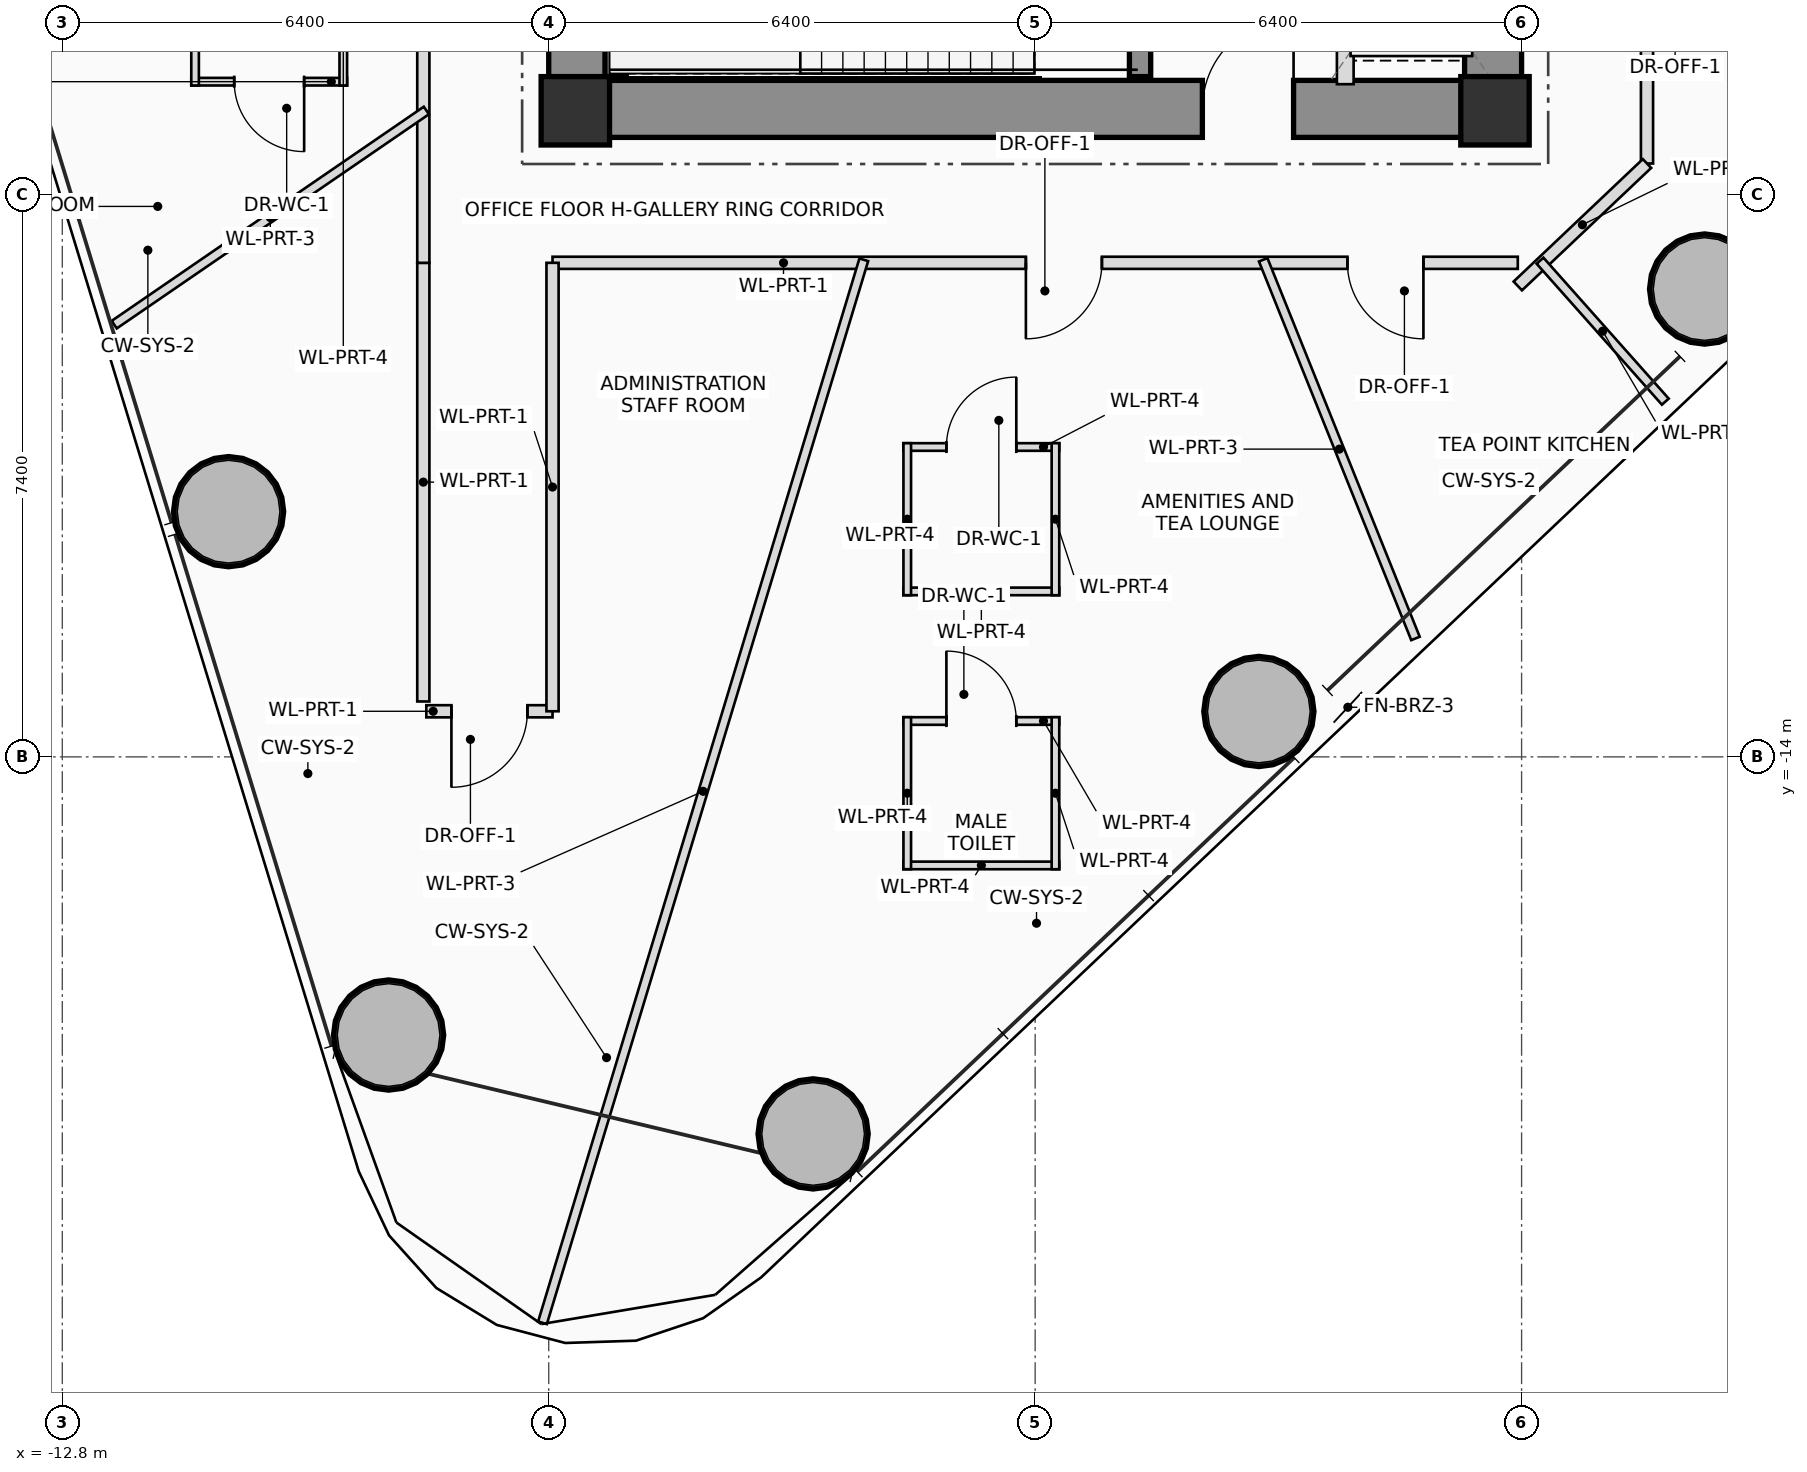
"""IFC4 building model, lengths in metres.
Left out: names, types, materials, properties, quantities, classifications, styles, units other than length and angle.
Written with IfcOpenShell. Run it as: python <this file> out.ifc"""

import sys

from ifc_helpers import new_model, si_unit, direction, frame, frame_2d, origin, origin_2d, place, context, subcontext, project, spatial, rectangle, hollow_circle, extrude, source, transform, mapped, element, fill, save


model = new_model("IFC4")
c1 = context("Model", 3, precision=1e-05, world=origin(), true_north=direction((0.0, 1.0)))
c2 = subcontext(c1, "Body", "Model", "MODEL_VIEW")
j1 = project(units=[si_unit("LENGTHUNIT", "METRE"), si_unit("PLANEANGLEUNIT", "RADIAN")], contexts=[c1])
p1 = place(None, origin())
s1 = spatial("IfcSite", under=j1, at=p1, CompositionType="ELEMENT")
p2 = place(p1, origin())
s2 = spatial("IfcBuilding", under=s1, at=p2, CompositionType="ELEMENT")
p3 = place(p2, frame((0.0, 0.0, 89.9)))
s3 = spatial("IfcBuildingStorey", under=s2, at=p3, CompositionType="ELEMENT", Elevation=89.9)
m1 = source(origin(), c2, "Body", "SweptSolid", [
    extrude(rectangle(XDim=0.9, YDim=0.9, at=origin_2d()), origin(), (0.0, 0.0, 1.0), 3.75),
])
for number, where, z_axis, x_axis in (
    (1, (-6.05, -5.5, 0.0), (0.0, 0.0, 1.0), (1.0, 0.0, 0.0)),
    (2, (6.05, -5.5, 0.0), (0.0, 0.0, 1.0), (1.0, 0.0, 0.0)),
):
    element("IfcColumn", number, at=place(p3, frame(where, z_axis=z_axis, x_axis=x_axis)), inside=s3, PredefinedType="COLUMN", context=c2, shape_type="MappedRepresentation", body=[
        mapped(m1, transform((0.0, 0.0, 0.0), scale=1.0)),
    ])
p4 = place(p3, frame((-6.4, -5.475, 0.0), z_axis=(0.0, 0.0, 1.0), x_axis=(1.0, 0.0, 0.0)))
e3 = element("IfcWall", 3, at=p4, inside=s3, PredefinedType="SHEAR", context=c2, shape_type="SweptSolid", body=[
    extrude(rectangle(XDim=12.8, YDim=0.75, at=frame_2d((6.4, 0.0))), origin(), (0.0, 0.0, 1.0), 3.75),
])
p5 = place(p4, frame((8.6, 0.0, 0.0)))
e4 = element("IfcOpeningElement", 4, at=p5, cuts=e3, PredefinedType="OPENING", context=c2, shape_type="SweptSolid", body=[
    extrude(rectangle(XDim=1.2, YDim=2.2, at=frame_2d((0.6, 1.1))), frame((0.0, 0.385, 0.0), z_axis=(0.0, -1.0, 0.0), x_axis=(1.0, 0.0, 0.0)), (0.0, 0.0, 1.0), 0.77),
])
p6 = place(p3, frame((6.025, -5.1, 0.0), z_axis=(0.0, 0.0, 1.0), x_axis=(0.0, 1.0, 0.0)))
e5 = element("IfcWall", 5, at=p6, inside=s3, PredefinedType="SHEAR", context=c2, shape_type="SweptSolid", body=[
    extrude(rectangle(XDim=10.2, YDim=0.75, at=frame_2d((5.1, 0.0))), origin(), (0.0, 0.0, 1.0), 3.75),
])
p7 = place(p3, frame((-6.025, -5.1, 0.0), z_axis=(0.0, 0.0, 1.0), x_axis=(0.0, 1.0, 0.0)))
e6 = element("IfcWall", 6, at=p7, inside=s3, PredefinedType="SHEAR", context=c2, shape_type="SweptSolid", body=[
    extrude(rectangle(XDim=3.35, YDim=0.75, at=frame_2d((1.675, 0.0))), origin(), (0.0, 0.0, 1.0), 3.75),
])
p8 = place(p3, frame((-5.52, -5.05, 0.0), z_axis=(0.0, 0.0, 1.0), x_axis=(0.0, 1.0, 0.0)))
e7 = element("IfcWall", 7, at=p8, inside=s3, PredefinedType="SHEAR", context=c2, shape_type="SweptSolid", body=[
    extrude(rectangle(XDim=2.75, YDim=0.28, at=frame_2d((1.375, 0.0))), origin(), (0.0, 0.0, 1.0), 3.75),
])
p9 = place(p3, frame((1.38, -5.05, 0.0), z_axis=(0.0, 0.0, 1.0), x_axis=(0.0, 1.0, 0.0)))
e8 = element("IfcWall", 8, at=p9, inside=s3, PredefinedType="SHEAR", context=c2, shape_type="SweptSolid", body=[
    extrude(rectangle(XDim=0.8, YDim=0.28, at=frame_2d((0.4, 0.0))), origin(), (0.0, 0.0, 1.0), 3.75),
])
m2 = source(origin(), c2, "Body", "SweptSolid", [
    extrude(hollow_circle(Radius=0.725, WallThickness=0.05, at=origin_2d()), origin(), (0.0, 0.0, 1.0), 3.75),
])
for number, where, z_axis, x_axis in (
    (9, (-2.921, -18.96, 0.0), (0.0, 0.0, 1.0), (1.0, 0.0, 0.0)),
    (10, (2.943, -13.402, 0.0), (0.0, 0.0, 1.0), (1.0, 0.0, 0.0)),
    (11, (8.808, -7.845, 0.0), (0.0, 0.0, 1.0), (1.0, 0.0, 0.0)),
    (12, (-10.612, -10.774, 0.0), (0.0, 0.0, 1.0), (1.0, 0.0, 0.0)),
    (13, (-8.507, -17.659, 0.0), (0.0, 0.0, 1.0), (1.0, 0.0, 0.0)),
):
    element("IfcColumn", number, at=place(p3, frame(where, z_axis=z_axis, x_axis=x_axis)), inside=s3, PredefinedType="COLUMN", context=c2, shape_type="MappedRepresentation", body=[
        mapped(m2, transform((0.0, 0.0, 0.0), scale=1.0)),
    ])
p10 = place(p3, frame((4.08, -5.15, 0.0), z_axis=(0.0, 0.0, 1.0), x_axis=(0.0, 1.0, 0.0)))
e14 = element("IfcWall", 14, at=p10, inside=s3, PredefinedType="PLUMBINGWALL", context=c2, shape_type="SweptSolid", body=[
    extrude(rectangle(XDim=2.95, YDim=0.22, at=frame_2d((1.475, 0.0))), origin(), (0.0, 0.0, 1.0), 3.545),
])
p11 = place(p10, frame((0.95, 0.0, 0.0)))
e15 = element("IfcOpeningElement", 15, at=p11, cuts=e14, PredefinedType="OPENING", context=c2, shape_type="SweptSolid", body=[
    extrude(rectangle(XDim=1.2, YDim=2.25, at=frame_2d((0.6, 1.125))), frame((0.0, 0.12, 0.0), z_axis=(0.0, -1.0, 0.0), x_axis=(1.0, 0.0, 0.0)), (0.0, 0.0, 1.0), 0.24),
])
p12 = place(p3, frame((-1.733, -13.528, 0.0), z_axis=(0.0, 0.0, 1.0), x_axis=(1.0, 0.0, 0.0)))
e16 = element("IfcWall", 16, at=p12, inside=s3, PredefinedType="PARTITIONING", context=c2, shape_type="SweptSolid", body=[
    extrude(rectangle(XDim=2.05, YDim=0.1, at=frame_2d((1.025, 0.0))), origin(), (0.0, 0.0, 1.0), 3.2),
])
p13 = place(p12, frame((0.565, 0.0, 0.0)))
e17 = element("IfcOpeningElement", 17, at=p13, cuts=e16, PredefinedType="OPENING", context=c2, shape_type="SweptSolid", body=[
    extrude(rectangle(XDim=0.92, YDim=2.1, at=frame_2d((0.46, 1.05))), frame((0.0, 0.06, 0.0), z_axis=(0.0, -1.0, 0.0), x_axis=(1.0, 0.0, 0.0)), (0.0, 0.0, 1.0), 0.12),
])
p14 = place(p3, frame((0.317, -15.428, 0.0), z_axis=(0.0, 0.0, 1.0), x_axis=(-1.0, 0.0, 0.0)))
e18 = element("IfcWall", 18, at=p14, inside=s3, PredefinedType="PARTITIONING", context=c2, shape_type="SweptSolid", body=[
    extrude(rectangle(XDim=2.05, YDim=0.1, at=frame_2d((1.025, 0.0))), origin(), (0.0, 0.0, 1.0), 3.545),
])
p15 = place(p3, frame((0.267, -13.478, 0.0), z_axis=(0.0, 0.0, 1.0), x_axis=(0.0, -1.0, 0.0)))
e19 = element("IfcWall", 19, at=p15, inside=s3, PredefinedType="PARTITIONING", context=c2, shape_type="SweptSolid", body=[
    extrude(rectangle(XDim=2.0, YDim=0.1, at=frame_2d((1.0, 0.0))), origin(), (0.0, 0.0, 1.0), 3.545),
])
p16 = place(p3, frame((-1.683, -15.478, 0.0), z_axis=(0.0, 0.0, 1.0), x_axis=(0.0, 1.0, 0.0)))
e20 = element("IfcWall", 20, at=p16, inside=s3, PredefinedType="PARTITIONING", context=c2, shape_type="SweptSolid", body=[
    extrude(rectangle(XDim=2.0, YDim=0.1, at=frame_2d((1.0, 0.0))), origin(), (0.0, 0.0, 1.0), 3.2),
])
p17 = place(p3, frame((-1.733, -9.923, 0.0), z_axis=(0.0, 0.0, 1.0), x_axis=(1.0, 0.0, 0.0)))
e21 = element("IfcWall", 21, at=p17, inside=s3, PredefinedType="PARTITIONING", context=c2, shape_type="SweptSolid", body=[
    extrude(rectangle(XDim=2.05, YDim=0.1, at=frame_2d((1.025, 0.0))), origin(), (0.0, 0.0, 1.0), 3.545),
])
p18 = place(p17, frame((0.565, 0.0, 0.0)))
e22 = element("IfcOpeningElement", 22, at=p18, cuts=e21, PredefinedType="OPENING", context=c2, shape_type="SweptSolid", body=[
    extrude(rectangle(XDim=0.92, YDim=2.1, at=frame_2d((0.46, 1.05))), frame((0.0, 0.06, 0.0), z_axis=(0.0, -1.0, 0.0), x_axis=(1.0, 0.0, 0.0)), (0.0, 0.0, 1.0), 0.12),
])
p19 = place(p3, frame((0.317, -11.823, 0.0), z_axis=(0.0, 0.0, 1.0), x_axis=(-1.0, 0.0, 0.0)))
e23 = element("IfcWall", 23, at=p19, inside=s3, PredefinedType="PARTITIONING", context=c2, shape_type="SweptSolid", body=[
    extrude(rectangle(XDim=2.05, YDim=0.1, at=frame_2d((1.025, 0.0))), origin(), (0.0, 0.0, 1.0), 3.05),
])
for number, where, z_axis, x_axis in (
    (24, (0.267, -9.873, 0.0), (0.0, 0.0, 1.0), (0.0, -1.0, 0.0)),
    (25, (-1.683, -11.873, 0.0), (0.0, 0.0, 1.0), (0.0, 1.0, 0.0)),
):
    element("IfcWall", number, at=place(p3, frame(where, z_axis=z_axis, x_axis=x_axis)), inside=s3, PredefinedType="PARTITIONING", context=c2, shape_type="SweptSolid", body=[
        extrude(rectangle(XDim=2.0, YDim=0.1, at=frame_2d((1.0, 0.0))), origin(), (0.0, 0.0, 1.0), 3.05),
    ])
p20 = place(p3, frame((-9.053, -5.117, 0.0), z_axis=(0.0, 0.0, 1.0), x_axis=(-1.0, 0.0, 0.0)))
e26 = element("IfcWall", 26, at=p20, inside=s3, PredefinedType="PARTITIONING", context=c2, shape_type="SweptSolid", body=[
    extrude(rectangle(XDim=2.05, YDim=0.1, at=frame_2d((1.025, 0.0))), origin(), (0.0, 0.0, 1.0), 3.05),
])
p21 = place(p20, frame((0.565, 0.0, 0.0)))
e27 = element("IfcOpeningElement", 27, at=p21, cuts=e26, PredefinedType="OPENING", context=c2, shape_type="SweptSolid", body=[
    extrude(rectangle(XDim=0.92, YDim=2.1, at=frame_2d((0.46, 1.05))), frame((0.0, 0.06, 0.0), z_axis=(0.0, -1.0, 0.0), x_axis=(1.0, 0.0, 0.0)), (0.0, 0.0, 1.0), 0.12),
])
for number, where, z_axis, x_axis in (
    (28, (-9.103, -3.167, 0.0), (0.0, 0.0, 1.0), (0.0, -1.0, 0.0)),
    (29, (-11.053, -5.167, 0.0), (0.0, 0.0, 1.0), (0.0, 1.0, 0.0)),
):
    element("IfcWall", number, at=place(p3, frame(where, z_axis=z_axis, x_axis=x_axis)), inside=s3, PredefinedType="PARTITIONING", context=c2, shape_type="SweptSolid", body=[
        extrude(rectangle(XDim=2.0, YDim=0.1, at=frame_2d((1.0, 0.0))), origin(), (0.0, 0.0, 1.0), 2.85),
    ])
p22 = place(p3, frame((-6.35, -13.4, 0.0), z_axis=(0.0, 0.0, 1.0), x_axis=(-1.0, 0.0, 0.0)))
e30 = element("IfcWall", 30, at=p22, inside=s3, PredefinedType="PARTITIONING", context=c2, shape_type="SweptSolid", body=[
    extrude(rectangle(XDim=1.66, YDim=0.16, at=frame_2d((0.83, 0.0))), origin(), (0.0, 0.0, 1.0), 2.85),
])
p23 = place(p22, frame((0.33, 0.0, 0.0)))
e31 = element("IfcOpeningElement", 31, at=p23, cuts=e30, PredefinedType="OPENING", context=c2, shape_type="SweptSolid", body=[
    extrude(rectangle(XDim=1.0, YDim=2.25, at=frame_2d((0.5, 1.125))), frame((0.0, 0.09, 0.0), z_axis=(0.0, -1.0, 0.0), x_axis=(1.0, 0.0, 0.0)), (0.0, 0.0, 1.0), 0.18),
])
p24 = place(p3, frame((-8.05, -13.271, 0.0), z_axis=(0.0, 0.0, 1.0), x_axis=(0.0, 1.0, 0.0)))
e32 = element("IfcWall", 32, at=p24, inside=s3, PredefinedType="PARTITIONING", context=c2, shape_type="SweptSolid", body=[
    extrude(rectangle(XDim=5.771, YDim=0.16, at=frame_2d((2.885, 0.0))), origin(), (0.0, 0.0, 1.0), 2.85),
])
p25 = place(p3, frame((-8.05, -7.5, 0.0), z_axis=(0.0, 0.0, 1.0), x_axis=(0.0, 1.0, 0.0)))
e33 = element("IfcWall", 33, at=p25, inside=s3, PredefinedType="PARTITIONING", context=c2, shape_type="SweptSolid", body=[
    extrude(rectangle(XDim=15.0, YDim=0.16, at=frame_2d((7.5, 0.0))), origin(), (0.0, 0.0, 1.0), 2.85),
])
p26 = place(p25, frame((3.292, 0.0, 0.0)))
e34 = element("IfcOpeningElement", 34, at=p26, cuts=e33, PredefinedType="OPENING", context=c2, shape_type="SweptSolid", body=[
    extrude(rectangle(XDim=1.0, YDim=2.25, at=frame_2d((0.5, 1.125))), frame((0.0, 0.09, 0.0), z_axis=(0.0, -1.0, 0.0), x_axis=(1.0, 0.0, 0.0)), (0.0, 0.0, 1.0), 0.18),
])
p27 = place(p25, frame((8.524, 0.0, 0.0)))
e35 = element("IfcOpeningElement", 35, at=p27, cuts=e33, PredefinedType="OPENING", context=c2, shape_type="SweptSolid", body=[
    extrude(rectangle(XDim=1.0, YDim=2.25, at=frame_2d((0.5, 1.125))), frame((0.0, 0.09, 0.0), z_axis=(0.0, -1.0, 0.0), x_axis=(1.0, 0.0, 0.0)), (0.0, 0.0, 1.0), 0.18),
])
p28 = place(p25, frame((13.105, 0.0, 0.0)))
e36 = element("IfcOpeningElement", 36, at=p28, cuts=e33, PredefinedType="OPENING", context=c2, shape_type="SweptSolid", body=[
    extrude(rectangle(XDim=1.0, YDim=2.25, at=frame_2d((0.5, 1.125))), frame((0.0, 0.09, 0.0), z_axis=(0.0, -1.0, 0.0), x_axis=(1.0, 0.0, 0.0)), (0.0, 0.0, 1.0), 0.18),
])
p29 = place(p3, frame((8.05, -0.02, 0.0), z_axis=(0.0, 0.0, 1.0), x_axis=(0.0, -1.0, 0.0)))
e37 = element("IfcWall", 37, at=p29, inside=s3, PredefinedType="PARTITIONING", context=c2, shape_type="SweptSolid", body=[
    extrude(rectangle(XDim=6.174, YDim=0.16, at=frame_2d((3.087, 0.0))), origin(), (0.0, 0.0, 1.0), 2.85),
])
p30 = place(p29, frame((2.587, 0.0, 0.0)))
e38 = element("IfcOpeningElement", 38, at=p30, cuts=e37, PredefinedType="OPENING", context=c2, shape_type="SweptSolid", body=[
    extrude(rectangle(XDim=1.0, YDim=2.25, at=frame_2d((0.5, 1.125))), frame((0.0, 0.09, 0.0), z_axis=(0.0, -1.0, 0.0), x_axis=(1.0, 0.0, 0.0)), (0.0, 0.0, 1.0), 0.18),
])
p31 = place(p3, frame((8.05, -6.194, 0.0), z_axis=(0.0, 0.0, 1.0), x_axis=(-0.725875977514, -0.687825606726, 0.0)))
e39 = element("IfcWall", 39, at=p31, inside=s3, PredefinedType="PARTITIONING", context=c2, shape_type="SweptSolid", body=[
    extrude(rectangle(XDim=2.342, YDim=0.16, at=frame_2d((1.171, 0.0))), origin(), (0.0, 0.0, 1.0), 2.85),
])
p32 = place(p3, frame((6.35, -7.5, 0.0), z_axis=(0.0, 0.0, 1.0), x_axis=(-1.0, 0.0, 0.0)))
e40 = element("IfcWall", 40, at=p32, inside=s3, PredefinedType="PARTITIONING", context=c2, shape_type="SweptSolid", body=[
    extrude(rectangle(XDim=12.7, YDim=0.16, at=frame_2d((6.35, 0.0))), origin(), (0.0, 0.0, 1.0), 2.85),
])
p33 = place(p32, frame((1.242, 0.0, 0.0)))
e41 = element("IfcOpeningElement", 41, at=p33, cuts=e40, PredefinedType="OPENING", context=c2, shape_type="SweptSolid", body=[
    extrude(rectangle(XDim=1.0, YDim=2.25, at=frame_2d((0.5, 1.125))), frame((0.0, 0.09, 0.0), z_axis=(0.0, -1.0, 0.0), x_axis=(1.0, 0.0, 0.0)), (0.0, 0.0, 1.0), 0.18),
])
p34 = place(p32, frame((5.472, 0.0, 0.0)))
e42 = element("IfcOpeningElement", 42, at=p34, cuts=e40, PredefinedType="OPENING", context=c2, shape_type="SweptSolid", body=[
    extrude(rectangle(XDim=1.0, YDim=2.25, at=frame_2d((0.5, 1.125))), frame((0.0, 0.09, 0.0), z_axis=(0.0, -1.0, 0.0), x_axis=(1.0, 0.0, 0.0)), (0.0, 0.0, 1.0), 0.18),
])
p35 = place(p3, frame((-6.35, -7.5, 0.0), z_axis=(0.0, 0.0, 1.0), x_axis=(0.0, -1.0, 0.0)))
e43 = element("IfcWall", 43, at=p35, inside=s3, PredefinedType="PARTITIONING", context=c2, shape_type="SweptSolid", body=[
    extrude(rectangle(XDim=5.9, YDim=0.16, at=frame_2d((2.95, 0.0))), origin(), (0.0, 0.0, 1.0), 2.85),
])
p36 = place(p3, frame((-8.01, -5.496, 0.0), z_axis=(0.0, 0.0, 1.0), x_axis=(-0.824586433319, -0.565735993186, 0.0)))
e44 = element("IfcWall", 44, at=p36, inside=s3, PredefinedType="PARTITIONING", context=c2, shape_type="SweptSolid", body=[
    extrude(rectangle(XDim=4.981, YDim=0.12, at=frame_2d((2.49, 0.0))), origin(), (0.0, 0.0, 1.0), 3.01),
])
p37 = place(p3, frame((-2.255, -7.46, 0.0), z_axis=(0.0, 0.0, 1.0), x_axis=(-0.289332531311, -0.957228648926, 0.0)))
e45 = element("IfcWall", 45, at=p37, inside=s3, PredefinedType="PARTITIONING", context=c2, shape_type="SweptSolid", body=[
    extrude(rectangle(XDim=14.611, YDim=0.12, at=frame_2d((7.305, 0.0))), origin(), (0.0, 0.0, 1.0), 2.85),
])
p38 = place(p3, frame((3.0, -7.46, 0.0), z_axis=(0.0, 0.0, 1.0), x_axis=(0.37313810105, -0.927775812115, 0.0)))
e46 = element("IfcWall", 46, at=p38, inside=s3, PredefinedType="PARTITIONING", context=c2, shape_type="SweptSolid", body=[
    extrude(rectangle(XDim=5.37, YDim=0.12, at=frame_2d((2.685, 0.0))), origin(), (0.0, 0.0, 1.0), 2.85),
])
p39 = place(p3, frame((6.643, -7.472, 0.0), z_axis=(0.0, 0.0, 1.0), x_axis=(0.66436383883, -0.747409318684, 0.0)))
e47 = element("IfcWall", 47, at=p39, inside=s3, PredefinedType="PARTITIONING", context=c2, shape_type="SweptSolid", body=[
    extrude(rectangle(XDim=2.481, YDim=0.12, at=frame_2d((1.241, 0.0))), origin(), (0.0, 0.0, 1.0), 3.01),
])
p40 = place(p5, origin())
e48 = element("IfcDoor", 48, at=p40, inside=s3, OperationType="SINGLE_SWING_RIGHT", PredefinedType="DOOR", context=c2, shape_type="SweptSolid", body=[
    extrude(rectangle(XDim=1.2, YDim=2.2, at=frame_2d((0.6, 1.1))), frame((0.0, 0.025, 0.0), z_axis=(0.0, -1.0, 0.0), x_axis=(1.0, 0.0, 0.0)), (0.0, 0.0, 1.0), 0.05),
])
fill(e4, e48)
p41 = place(p13, origin())
e49 = element("IfcDoor", 49, at=p41, inside=s3, OperationType="SINGLE_SWING_LEFT", PredefinedType="DOOR", context=c2, shape_type="SweptSolid", body=[
    extrude(rectangle(XDim=0.92, YDim=2.1, at=frame_2d((0.46, 1.05))), frame((0.0, 0.025, 0.0), z_axis=(0.0, -1.0, 0.0), x_axis=(1.0, 0.0, 0.0)), (0.0, 0.0, 1.0), 0.05),
])
fill(e17, e49)
p42 = place(p18, origin())
e50 = element("IfcDoor", 50, at=p42, inside=s3, OperationType="SINGLE_SWING_RIGHT", PredefinedType="DOOR", context=c2, shape_type="SweptSolid", body=[
    extrude(rectangle(XDim=0.92, YDim=2.1, at=frame_2d((0.46, 1.05))), frame((0.0, 0.025, 0.0), z_axis=(0.0, -1.0, 0.0), x_axis=(1.0, 0.0, 0.0)), (0.0, 0.0, 1.0), 0.05),
])
fill(e22, e50)
p43 = place(p21, origin())
e51 = element("IfcDoor", 51, at=p43, inside=s3, OperationType="SINGLE_SWING_LEFT", PredefinedType="DOOR", context=c2, shape_type="SweptSolid", body=[
    extrude(rectangle(XDim=0.92, YDim=2.1, at=frame_2d((0.46, 1.05))), frame((0.0, 0.025, 0.0), z_axis=(0.0, -1.0, 0.0), x_axis=(1.0, 0.0, 0.0)), (0.0, 0.0, 1.0), 0.05),
])
fill(e27, e51)
p44 = place(p23, origin())
e52 = element("IfcDoor", 52, at=p44, inside=s3, OperationType="SINGLE_SWING_RIGHT", PredefinedType="DOOR", context=c2, shape_type="SweptSolid", body=[
    extrude(rectangle(XDim=1.0, YDim=2.25, at=frame_2d((0.5, 1.125))), frame((0.0, 0.025, 0.0), z_axis=(0.0, -1.0, 0.0), x_axis=(1.0, 0.0, 0.0)), (0.0, 0.0, 1.0), 0.05),
])
fill(e31, e52)
p45 = place(p33, origin())
e53 = element("IfcDoor", 53, at=p45, inside=s3, OperationType="SINGLE_SWING_LEFT", PredefinedType="DOOR", context=c2, shape_type="SweptSolid", body=[
    extrude(rectangle(XDim=1.0, YDim=2.25, at=frame_2d((0.5, 1.125))), frame((0.0, 0.025, 0.0), z_axis=(0.0, -1.0, 0.0), x_axis=(1.0, 0.0, 0.0)), (0.0, 0.0, 1.0), 0.05),
])
fill(e41, e53)
p46 = place(p34, origin())
e54 = element("IfcDoor", 54, at=p46, inside=s3, OperationType="SINGLE_SWING_RIGHT", PredefinedType="DOOR", context=c2, shape_type="SweptSolid", body=[
    extrude(rectangle(XDim=1.0, YDim=2.25, at=frame_2d((0.5, 1.125))), frame((0.0, 0.025, 0.0), z_axis=(0.0, -1.0, 0.0), x_axis=(1.0, 0.0, 0.0)), (0.0, 0.0, 1.0), 0.05),
])
fill(e42, e54)
save(model, sys.argv[1])
